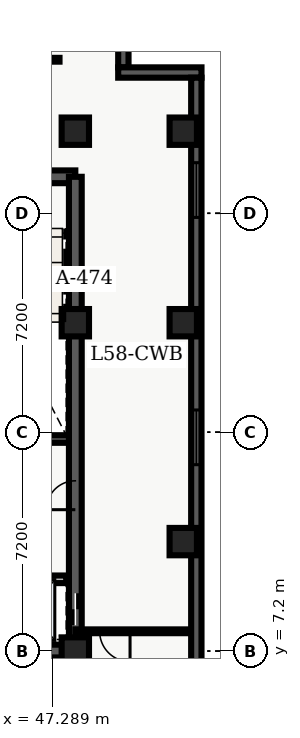
"""IFC4 building model, lengths in metres.
Left out: names, types, materials, properties, quantities, classifications, styles, units other than length and angle.
Written with IfcOpenShell. Run it as: python <this file> out.ifc"""

import sys

from ifc_helpers import new_model, entity, si_unit, converted_unit, direction, frame, origin_with_axes, origin_2d_with_axis, place, context, subcontext, project, spatial, polyline, rectangle, outline, extrude, element, fill, save


model = new_model("IFC4")
c1 = context("Model", 3, precision=1e-05, world=origin_with_axes(), true_north=direction((0.0, 1.0)))
c2 = subcontext(c1, "Body", "Model", "MODEL_VIEW")
j1 = project(units=[si_unit("LENGTHUNIT", "METRE"), converted_unit("PLANEANGLEUNIT", "DEGREE", entity("IfcPlaneAngleMeasure", 0.017), si_unit("PLANEANGLEUNIT", "RADIAN"), dimensions=[0, 0, 0, 0, 0, 0, 0])], contexts=[c1])
p1 = place(None, origin_with_axes())
s1 = spatial("IfcSite", under=j1, at=p1, CompositionType="ELEMENT")
p2 = place(p1, origin_with_axes())
s2 = spatial("IfcBuilding", under=s1, at=p2, CompositionType="ELEMENT")
p3 = place(p2, frame((0.0, 0.0, 236.4), z_axis=(0.0, 0.0, 1.0), x_axis=(1.0, 0.0, 0.0)))
s3 = spatial("IfcBuildingStorey", under=s2, at=p3, CompositionType="ELEMENT", Elevation=236.4)
p4 = place(p3, frame((40.2, 7.2, 0.0), z_axis=(0.0, 0.0, 1.0), x_axis=(1.0, 0.0, 0.0)))
e1 = element("IfcWall", 1, at=p4, inside=s3, PredefinedType="SHEAR", context=c2, shape_type="SweptSolid", body=[
    extrude(outline(polyline([(0.0, -0.21), (7.85, -0.21), (7.85, 0.21), (0.0, 0.21), (0.0, -0.21)])), origin_with_axes(), (0.0, 0.0, 1.0), 3.66),
])
p5 = place(p4, frame((2.175, 0.0, 0.0), z_axis=(0.0, 0.0, 1.0), x_axis=(1.0, 0.0, 0.0)))
e2 = element("IfcOpeningElement", 2, at=p5, cuts=e1, PredefinedType="OPENING", context=c2, shape_type="SweptSolid", body=[
    extrude(rectangle(XDim=1.05, YDim=0.44, at=origin_2d_with_axis()), origin_with_axes(), (0.0, 0.0, 1.0), 2.15),
])
p6 = place(p3, frame((40.2, 22.8, 0.0), z_axis=(0.0, 0.0, 1.0), x_axis=(1.0, 0.0, 0.0)))
e3 = element("IfcWall", 3, at=p6, inside=s3, PredefinedType="SHEAR", context=c2, shape_type="SweptSolid", body=[
    extrude(outline(polyline([(0.0, -0.21), (7.85, -0.21), (7.85, 0.21), (0.0, 0.21), (0.0, -0.21)])), origin_with_axes(), (0.0, 0.0, 1.0), 3.66),
])
p7 = place(p6, frame((5.775, 0.0, 0.0), z_axis=(0.0, 0.0, 1.0), x_axis=(1.0, 0.0, 0.0)))
e4 = element("IfcOpeningElement", 4, at=p7, cuts=e3, PredefinedType="OPENING", context=c2, shape_type="SweptSolid", body=[
    extrude(rectangle(XDim=1.05, YDim=0.44, at=origin_2d_with_axis()), origin_with_axes(), (0.0, 0.0, 1.0), 2.15),
])
p8 = place(p6, frame((2.15, 0.0, 0.0), z_axis=(0.0, 0.0, 1.0), x_axis=(1.0, 0.0, 0.0)))
e5 = element("IfcOpeningElement", 5, at=p8, cuts=e3, PredefinedType="OPENING", context=c2, shape_type="SweptSolid", body=[
    extrude(rectangle(XDim=0.9, YDim=0.44, at=origin_2d_with_axis()), origin_with_axes(), (0.0, 0.0, 1.0), 2.15),
])
p9 = place(p3, frame((48.05, 7.2, 0.0), z_axis=(0.0, 0.0, 1.0), x_axis=(0.0, 1.0, 0.0)))
e6 = element("IfcWall", 6, at=p9, inside=s3, PredefinedType="SHEAR", context=c2, shape_type="SweptSolid", body=[
    extrude(outline(polyline([(0.0, -0.21), (15.6, -0.21), (15.6, 0.21), (0.0, 0.21), (0.0, -0.21)])), origin_with_axes(), (0.0, 0.0, 1.0), 3.66),
])
p10 = place(p9, frame((1.375, 0.0, 0.0), z_axis=(0.0, 0.0, 1.0), x_axis=(1.0, 0.0, 0.0)))
e7 = element("IfcOpeningElement", 7, at=p10, cuts=e6, PredefinedType="OPENING", context=c2, shape_type="SweptSolid", body=[
    extrude(rectangle(XDim=1.05, YDim=0.44, at=origin_2d_with_axis()), origin_with_axes(), (0.0, 0.0, 1.0), 2.15),
])
p11 = place(p9, frame((5.125, 0.0, 0.0), z_axis=(0.0, 0.0, 1.0), x_axis=(1.0, 0.0, 0.0)))
e8 = element("IfcOpeningElement", 8, at=p11, cuts=e6, PredefinedType="OPENING", context=c2, shape_type="SweptSolid", body=[
    extrude(rectangle(XDim=0.95, YDim=0.44, at=origin_2d_with_axis()), origin_with_axes(), (0.0, 0.0, 1.0), 2.15),
])
p12 = place(p3, frame((44.25, 14.175, 0.0), z_axis=(0.0, 0.0, 1.0), x_axis=(1.0, 0.0, 0.0)))
e9 = element("IfcWall", 9, at=p12, inside=s3, PredefinedType="SHEAR", context=c2, shape_type="SweptSolid", body=[
    extrude(outline(polyline([(0.0, -0.125), (3.59, -0.125), (3.59, 0.125), (0.0, 0.125), (0.0, -0.125)])), origin_with_axes(), (0.0, 0.0, 1.0), 3.66),
])
for number, where, z_axis, x_axis in (
    (10, (48.05, 7.2, 0.0), (0.0, 0.0, 1.0), (1.0, 0.0, 0.0)),
    (11, (48.05, 18.0, 0.0), (0.0, 0.0, 1.0), (1.0, 0.0, 0.0)),
    (12, (48.05, 24.3, 0.0), (0.0, 0.0, 1.0), (1.0, 0.0, 0.0)),
    (13, (51.6, 10.8, 0.0), (0.0, 0.0, 1.0), (1.0, 0.0, 0.0)),
    (14, (51.6, 18.0, 0.0), (0.0, 0.0, 1.0), (1.0, 0.0, 0.0)),
    (15, (51.6, 24.3, 0.0), (0.0, 0.0, 1.0), (1.0, 0.0, 0.0)),
):
    element("IfcColumn", number, at=place(p3, frame(where, z_axis=z_axis, x_axis=x_axis)), inside=s3, PredefinedType="COLUMN", context=c2, shape_type="SweptSolid", body=[
        extrude(rectangle(XDim=0.9, YDim=0.9, at=origin_2d_with_axis()), origin_with_axes(), (0.0, 0.0, 1.0), 3.9),
    ])
p13 = place(p3, frame((44.25, 9.56, 0.0), z_axis=(0.0, 0.0, 1.0), x_axis=(1.0, 0.0, 0.0)))
e16 = element("IfcWall", 16, at=p13, inside=s3, PredefinedType="SOLIDWALL", context=c2, shape_type="SweptSolid", body=[
    extrude(outline(polyline([(0.0, -0.125), (3.5, -0.125), (3.5, 0.125), (0.0, 0.125), (0.0, -0.125)])), origin_with_axes(), (0.0, 0.0, 1.0), 2.7),
])
p14 = place(p3, frame((51.865, 7.85, 0.0), z_axis=(0.0, 0.0, 1.0), x_axis=(-1.0, 0.0, 0.0)))
e17 = element("IfcWall", 17, at=p14, inside=s3, PredefinedType="PARTITIONING", context=c2, shape_type="SweptSolid", body=[
    extrude(outline(polyline([(0.0, -0.062), (3.815, -0.062), (3.815, 0.062), (0.0, 0.062), (0.0, -0.062)])), origin_with_axes(), (0.0, 0.0, 1.0), 2.7),
])
p15 = place(p14, frame((2.515, 0.0, 0.0), z_axis=(0.0, 0.0, 1.0), x_axis=(1.0, 0.0, 0.0)))
e18 = element("IfcOpeningElement", 18, at=p15, cuts=e17, PredefinedType="OPENING", context=c2, shape_type="SweptSolid", body=[
    extrude(rectangle(XDim=1.0, YDim=0.145, at=origin_2d_with_axis()), origin_with_axes(), (0.0, 0.0, 1.0), 2.15),
])
p16 = place(p3, frame((36.335, 26.65, 0.0), z_axis=(0.0, 0.0, 1.0), x_axis=(1.0, 0.0, 0.0)))
e19 = element("IfcWall", 19, at=p16, inside=s3, PredefinedType="PARTITIONING", context=c2, shape_type="SweptSolid", body=[
    extrude(outline(polyline([(0.0, -0.062), (11.195, -0.062), (11.195, 0.062), (0.0, 0.062), (0.0, -0.062)])), origin_with_axes(), (0.0, 0.0, 1.0), 2.7),
])
p17 = place(p16, frame((6.665, 0.0, 0.0), z_axis=(0.0, 0.0, 1.0), x_axis=(1.0, 0.0, 0.0)))
e20 = element("IfcOpeningElement", 20, at=p17, cuts=e19, PredefinedType="OPENING", context=c2, shape_type="SweptSolid", body=[
    extrude(rectangle(XDim=1.0, YDim=0.145, at=origin_2d_with_axis()), origin_with_axes(), (0.0, 0.0, 1.0), 2.15),
])
p18 = place(p3, frame((49.63, 28.46, 0.0), z_axis=(0.0, 0.0, 1.0), x_axis=(0.0, -1.0, 0.0)))
e21 = element("IfcWall", 21, at=p18, inside=s3, PredefinedType="SOLIDWALL", context=c2, shape_type="SweptSolid", body=[
    extrude(outline(polyline([(0.0, -0.17), (2.06, -0.17), (2.06, 0.17), (0.0, 0.17), (0.0, -0.17)])), origin_with_axes(), (0.0, 0.0, 1.0), 3.66),
])
p19 = place(p3, frame((49.46, 26.23, 0.0), z_axis=(0.0, 0.0, 1.0), x_axis=(1.0, 0.0, 0.0)))
e22 = element("IfcWall", 22, at=p19, inside=s3, PredefinedType="SOLIDWALL", context=c2, shape_type="SweptSolid", body=[
    extrude(outline(polyline([(0.0, -0.17), (2.74, -0.17), (2.74, 0.17), (0.0, 0.17), (0.0, -0.17)])), origin_with_axes(), (0.0, 0.0, 1.0), 3.66),
])
p20 = place(p3, frame((52.03, 26.06, 0.0), z_axis=(0.0, 0.0, 1.0), x_axis=(0.0, -1.0, 0.0)))
e23 = element("IfcWall", 23, at=p20, inside=s3, PredefinedType="SOLIDWALL", context=c2, shape_type="SweptSolid", body=[
    extrude(outline(polyline([(0.0, -0.17), (23.66, -0.17), (23.66, 0.17), (0.0, 0.17), (0.0, -0.17)])), origin_with_axes(), (0.0, 0.0, 1.0), 3.66),
])
p21 = place(p20, frame((3.696, 0.0, 0.45), z_axis=(0.0, 0.0, 1.0), x_axis=(1.0, 0.0, 0.0)))
e24 = element("IfcOpeningElement", 24, at=p21, cuts=e23, PredefinedType="OPENING", context=c2, shape_type="SweptSolid", body=[
    extrude(rectangle(XDim=1.8, YDim=0.36, at=origin_2d_with_axis()), origin_with_axes(), (0.0, 0.0, 1.0), 2.1),
])
p22 = place(p20, frame((11.83, 0.0, 0.45), z_axis=(0.0, 0.0, 1.0), x_axis=(1.0, 0.0, 0.0)))
e25 = element("IfcOpeningElement", 25, at=p22, cuts=e23, PredefinedType="OPENING", context=c2, shape_type="SweptSolid", body=[
    extrude(rectangle(XDim=1.8, YDim=0.36, at=origin_2d_with_axis()), origin_with_axes(), (0.0, 0.0, 1.0), 2.1),
])
p23 = place(p20, frame((20.364, 0.0, 0.45), z_axis=(0.0, 0.0, 1.0), x_axis=(1.0, 0.0, 0.0)))
e26 = element("IfcOpeningElement", 26, at=p23, cuts=e23, PredefinedType="OPENING", context=c2, shape_type="SweptSolid", body=[
    extrude(rectangle(XDim=1.8, YDim=0.36, at=origin_2d_with_axis()), origin_with_axes(), (0.0, 0.0, 1.0), 2.1),
])
p24 = place(p9, frame((1.375, 0.0, 0.0), z_axis=(0.0, 0.0, 1.0), x_axis=(1.0, 0.0, 0.0)))
e27 = element("IfcDoor", 27, at=p24, inside=s3, OperationType="SLIDING_TO_LEFT", PredefinedType="DOOR", context=c2, shape_type="SweptSolid", body=[
    extrude(rectangle(XDim=1.05, YDim=0.09, at=origin_2d_with_axis()), origin_with_axes(), (0.0, 0.0, 1.0), 2.15),
])
fill(e7, e27)
p25 = place(p9, frame((5.125, 0.0, 0.0), z_axis=(0.0, 0.0, 1.0), x_axis=(1.0, 0.0, 0.0)))
e28 = element("IfcDoor", 28, at=p25, inside=s3, OperationType="SINGLE_SWING_LEFT", PredefinedType="DOOR", context=c2, shape_type="SweptSolid", body=[
    extrude(rectangle(XDim=0.95, YDim=0.09, at=origin_2d_with_axis()), origin_with_axes(), (0.0, 0.0, 1.0), 2.15),
])
fill(e8, e28)
p26 = place(p14, frame((2.515, 0.0, 0.0), z_axis=(0.0, 0.0, 1.0), x_axis=(1.0, 0.0, 0.0)))
e29 = element("IfcDoor", 29, at=p26, inside=s3, OperationType="SINGLE_SWING_LEFT", PredefinedType="DOOR", context=c2, shape_type="SweptSolid", body=[
    extrude(rectangle(XDim=1.0, YDim=0.075, at=origin_2d_with_axis()), origin_with_axes(), (0.0, 0.0, 1.0), 2.15),
])
fill(e18, e29)
p27 = place(p20, frame((3.696, 0.0, 0.45), z_axis=(0.0, 0.0, 1.0), x_axis=(1.0, 0.0, 0.0)))
e30 = element("IfcWindow", 30, at=p27, inside=s3, PredefinedType="WINDOW", context=c2, shape_type="SweptSolid", body=[
    extrude(rectangle(XDim=1.8, YDim=0.09, at=origin_2d_with_axis()), origin_with_axes(), (0.0, 0.0, 1.0), 2.1),
])
fill(e24, e30)
p28 = place(p20, frame((11.83, 0.0, 0.45), z_axis=(0.0, 0.0, 1.0), x_axis=(1.0, 0.0, 0.0)))
e31 = element("IfcWindow", 31, at=p28, inside=s3, PredefinedType="WINDOW", context=c2, shape_type="SweptSolid", body=[
    extrude(rectangle(XDim=1.8, YDim=0.09, at=origin_2d_with_axis()), origin_with_axes(), (0.0, 0.0, 1.0), 2.1),
])
fill(e25, e31)
save(model, sys.argv[1])
